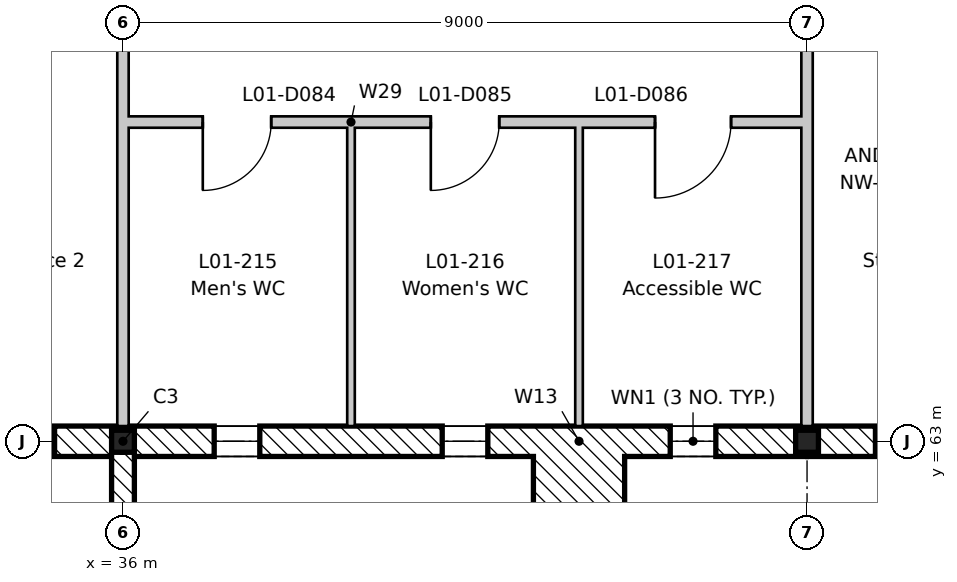
"""IFC4 building model, lengths in metres.
Left out: names, types, materials, properties, quantities, classifications, styles, units other than length and angle.
Written with IfcOpenShell. Run it as: python <this file> out.ifc"""

import sys

from ifc_helpers import new_model, si_unit, direction, frame, frame_2d, origin, origin_2d, place, context, subcontext, project, spatial, rectangle, i_section, extrude, element, fill, save


model = new_model("IFC4")
c1 = context("Model", 3, precision=1e-05, world=origin(), true_north=direction((0.0, 1.0)))
c2 = subcontext(c1, "Body", "Model", "MODEL_VIEW")
j1 = project(units=[si_unit("LENGTHUNIT", "METRE"), si_unit("PLANEANGLEUNIT", "RADIAN")], contexts=[c1])
p1 = place(None, origin())
s1 = spatial("IfcSite", under=j1, at=p1, CompositionType="ELEMENT")
p2 = place(p1, origin())
s2 = spatial("IfcBuilding", under=s1, at=p2, CompositionType="ELEMENT")
p3 = place(p2, frame((0.0, 0.0, 5.4)))
s3 = spatial("IfcBuildingStorey", under=s2, at=p3, CompositionType="ELEMENT", Elevation=5.4)
for number, where, z_axis, x_axis in (
    (1, (36.0, 63.0, -0.2), (0.0, 0.0, 1.0), (1.0, 0.0, 0.0)),
    (2, (45.0, 63.0, -0.2), (0.0, 0.0, 1.0), (1.0, 0.0, 0.0)),
):
    element("IfcColumn", number, at=place(p3, frame(where, z_axis=z_axis, x_axis=x_axis)), inside=s3, PredefinedType="COLUMN", context=c2, shape_type="SweptSolid", body=[
        extrude(i_section(OverallWidth=0.3, OverallDepth=0.29, WebThickness=0.009, FlangeThickness=0.014, FilletRadius=0.027, at=origin_2d()), origin(), (0.0, 0.0, 1.0), 4.5),
    ])
p4 = place(p3, frame((35.991, 63.0, 0.0), z_axis=(0.0, 0.0, 1.0), x_axis=(-1.0, 0.0, 0.0)))
e3 = element("IfcWall", 3, at=p4, inside=s3, PredefinedType="STANDARD", context=c2, shape_type="SweptSolid", body=[
    extrude(rectangle(XDim=8.981, YDim=0.4, at=frame_2d((4.491, 0.0))), origin(), (0.0, 0.0, 1.0), 3.9),
])
p5 = place(p4, frame((3.591, 0.0, 0.0)))
e4 = element("IfcOpeningElement", 4, at=p5, cuts=e3, PredefinedType="OPENING", context=c2, shape_type="SweptSolid", body=[
    extrude(rectangle(XDim=1.8, YDim=2.4, at=frame_2d((0.9, 1.2))), frame((0.0, 0.21, 0.0), z_axis=(0.0, -1.0, 0.0), x_axis=(1.0, 0.0, 0.0)), (0.0, 0.0, 1.0), 0.42),
])
p6 = place(p4, frame((6.891, 0.0, 0.9)))
e5 = element("IfcOpeningElement", 5, at=p6, cuts=e3, PredefinedType="OPENING", context=c2, shape_type="SweptSolid", body=[
    extrude(rectangle(XDim=1.2, YDim=2.4, at=frame_2d((0.6, 1.2))), frame((0.0, 0.21, 0.0), z_axis=(0.0, -1.0, 0.0), x_axis=(1.0, 0.0, 0.0)), (0.0, 0.0, 1.0), 0.42),
])
p7 = place(p4, frame((0.891, 0.0, 0.9)))
e6 = element("IfcOpeningElement", 6, at=p7, cuts=e3, PredefinedType="OPENING", context=c2, shape_type="SweptSolid", body=[
    extrude(rectangle(XDim=1.2, YDim=2.4, at=frame_2d((0.6, 1.2))), frame((0.0, 0.21, 0.0), z_axis=(0.0, -1.0, 0.0), x_axis=(1.0, 0.0, 0.0)), (0.0, 0.0, 1.0), 0.42),
])
p8 = place(p3, frame((44.991, 63.0, 0.0), z_axis=(0.0, 0.0, 1.0), x_axis=(-1.0, 0.0, 0.0)))
e7 = element("IfcWall", 7, at=p8, inside=s3, PredefinedType="STANDARD", context=c2, shape_type="SweptSolid", body=[
    extrude(rectangle(XDim=8.981, YDim=0.4, at=frame_2d((4.491, 0.0))), origin(), (0.0, 0.0, 1.0), 3.9),
])
p9 = place(p8, frame((7.191, 0.0, 1.5)))
e8 = element("IfcOpeningElement", 8, at=p9, cuts=e7, PredefinedType="OPENING", context=c2, shape_type="SweptSolid", body=[
    extrude(rectangle(XDim=0.6, YDim=1.2, at=frame_2d((0.3, 0.6))), frame((0.0, 0.21, 0.0), z_axis=(0.0, -1.0, 0.0), x_axis=(1.0, 0.0, 0.0)), (0.0, 0.0, 1.0), 0.42),
])
p10 = place(p8, frame((4.191, 0.0, 1.5)))
e9 = element("IfcOpeningElement", 9, at=p10, cuts=e7, PredefinedType="OPENING", context=c2, shape_type="SweptSolid", body=[
    extrude(rectangle(XDim=0.6, YDim=1.2, at=frame_2d((0.3, 0.6))), frame((0.0, 0.21, 0.0), z_axis=(0.0, -1.0, 0.0), x_axis=(1.0, 0.0, 0.0)), (0.0, 0.0, 1.0), 0.42),
])
p11 = place(p8, frame((1.191, 0.0, 1.5)))
e10 = element("IfcOpeningElement", 10, at=p11, cuts=e7, PredefinedType="OPENING", context=c2, shape_type="SweptSolid", body=[
    extrude(rectangle(XDim=0.6, YDim=1.2, at=frame_2d((0.3, 0.6))), frame((0.0, 0.21, 0.0), z_axis=(0.0, -1.0, 0.0), x_axis=(1.0, 0.0, 0.0)), (0.0, 0.0, 1.0), 0.42),
])
p12 = place(p3, frame((53.991, 63.0, 0.0), z_axis=(0.0, 0.0, 1.0), x_axis=(-1.0, 0.0, 0.0)))
e11 = element("IfcWall", 11, at=p12, inside=s3, PredefinedType="STANDARD", context=c2, shape_type="SweptSolid", body=[
    extrude(rectangle(XDim=8.981, YDim=0.4, at=frame_2d((4.491, 0.0))), origin(), (0.0, 0.0, 1.0), 3.9),
])
p13 = place(p12, frame((6.891, 0.0, 0.9)))
e12 = element("IfcOpeningElement", 12, at=p13, cuts=e11, PredefinedType="OPENING", context=c2, shape_type="SweptSolid", body=[
    extrude(rectangle(XDim=1.2, YDim=2.4, at=frame_2d((0.6, 1.2))), frame((0.0, 0.21, 0.0), z_axis=(0.0, -1.0, 0.0), x_axis=(1.0, 0.0, 0.0)), (0.0, 0.0, 1.0), 0.42),
])
p14 = place(p12, frame((3.891, 0.0, 0.9)))
e13 = element("IfcOpeningElement", 13, at=p14, cuts=e11, PredefinedType="OPENING", context=c2, shape_type="SweptSolid", body=[
    extrude(rectangle(XDim=1.2, YDim=2.7, at=frame_2d((0.6, 1.35))), frame((0.0, 0.21, 0.0), z_axis=(0.0, -1.0, 0.0), x_axis=(1.0, 0.0, 0.0)), (0.0, 0.0, 1.0), 0.42),
])
p15 = place(p3, frame((41.4, 62.2, 0.0), z_axis=(0.0, 0.0, 1.0), x_axis=(1.0, 0.0, 0.0)))
e14 = element("IfcWall", 14, at=p15, inside=s3, PredefinedType="STANDARD", context=c2, shape_type="SweptSolid", body=[
    extrude(rectangle(XDim=1.2, YDim=1.2, at=frame_2d((0.6, 0.0))), origin(), (0.0, 0.0, 1.0), 4.5),
])
p16 = place(p3, frame((36.0, 62.855, 0.0), z_axis=(0.0, 0.0, 1.0), x_axis=(0.0, -1.0, 0.0)))
e15 = element("IfcWall", 15, at=p16, inside=s3, PredefinedType="STANDARD", context=c2, shape_type="SweptSolid", body=[
    extrude(rectangle(XDim=2.255, YDim=0.3, at=frame_2d((1.127, 0.0))), origin(), (0.0, 0.0, 1.0), 3.97),
])
for number, where, z_axis, x_axis in (
    (16, (36.0, 63.2, 0.0), (0.0, 0.0, 1.0), (0.0, 1.0, 0.0)),
    (17, (45.0, 63.2, 0.0), (0.0, 0.0, 1.0), (0.0, 1.0, 0.0)),
):
    element("IfcWall", number, at=place(p3, frame(where, z_axis=z_axis, x_axis=x_axis)), inside=s3, PredefinedType="PARTITIONING", context=c2, shape_type="SweptSolid", body=[
        extrude(rectangle(XDim=7.225, YDim=0.15, at=frame_2d((3.613, 0.0))), origin(), (0.0, 0.0, 1.0), 3.95),
    ])
p17 = place(p3, frame((36.075, 67.2, 0.0), z_axis=(0.0, 0.0, 1.0), x_axis=(1.0, 0.0, 0.0)))
e18 = element("IfcWall", 18, at=p17, inside=s3, PredefinedType="PARTITIONING", context=c2, shape_type="SweptSolid", body=[
    extrude(rectangle(XDim=8.85, YDim=0.15, at=frame_2d((4.425, 0.0))), origin(), (0.0, 0.0, 1.0), 4.3),
])
p18 = place(p17, frame((0.975, 0.0, 0.0)))
e19 = element("IfcOpeningElement", 19, at=p18, cuts=e18, PredefinedType="OPENING", context=c2, shape_type="SweptSolid", body=[
    extrude(rectangle(XDim=0.9, YDim=2.1, at=frame_2d((0.45, 1.05))), frame((0.0, 0.085, 0.0), z_axis=(0.0, -1.0, 0.0), x_axis=(1.0, 0.0, 0.0)), (0.0, 0.0, 1.0), 0.17),
])
p19 = place(p17, frame((3.975, 0.0, 0.0)))
e20 = element("IfcOpeningElement", 20, at=p19, cuts=e18, PredefinedType="OPENING", context=c2, shape_type="SweptSolid", body=[
    extrude(rectangle(XDim=0.9, YDim=2.1, at=frame_2d((0.45, 1.05))), frame((0.0, 0.085, 0.0), z_axis=(0.0, -1.0, 0.0), x_axis=(1.0, 0.0, 0.0)), (0.0, 0.0, 1.0), 0.17),
])
p20 = place(p17, frame((6.925, 0.0, 0.0)))
e21 = element("IfcOpeningElement", 21, at=p20, cuts=e18, PredefinedType="OPENING", context=c2, shape_type="SweptSolid", body=[
    extrude(rectangle(XDim=1.0, YDim=2.1, at=frame_2d((0.5, 1.05))), frame((0.0, 0.085, 0.0), z_axis=(0.0, -1.0, 0.0), x_axis=(1.0, 0.0, 0.0)), (0.0, 0.0, 1.0), 0.17),
])
for number, where, z_axis, x_axis in (
    (22, (39.0, 63.2, 0.0), (0.0, 0.0, 1.0), (0.0, 1.0, 0.0)),
    (23, (42.0, 63.2, 0.0), (0.0, 0.0, 1.0), (0.0, 1.0, 0.0)),
):
    element("IfcWall", number, at=place(p3, frame(where, z_axis=z_axis, x_axis=x_axis)), inside=s3, PredefinedType="PARTITIONING", context=c2, shape_type="SweptSolid", body=[
        extrude(rectangle(XDim=3.925, YDim=0.1, at=frame_2d((1.962, 0.0))), origin(), (0.0, 0.0, 1.0), 4.3),
    ])
p21 = place(p7, origin())
e24 = element("IfcWindow", 24, at=p21, inside=s3, PartitioningType="SINGLE_PANEL", PredefinedType="WINDOW", context=c2, shape_type="SweptSolid", body=[
    extrude(rectangle(XDim=1.2, YDim=2.4, at=frame_2d((0.6, 1.2))), frame((0.0, -0.12, 0.0), z_axis=(0.0, -1.0, 0.0), x_axis=(1.0, 0.0, 0.0)), (0.0, 0.0, 1.0), 0.06),
])
fill(e6, e24)
p22 = place(p9, origin())
e25 = element("IfcWindow", 25, at=p22, inside=s3, PartitioningType="SINGLE_PANEL", PredefinedType="WINDOW", context=c2, shape_type="SweptSolid", body=[
    extrude(rectangle(XDim=0.6, YDim=1.2, at=frame_2d((0.3, 0.6))), frame((0.0, -0.12, 0.0), z_axis=(0.0, -1.0, 0.0), x_axis=(1.0, 0.0, 0.0)), (0.0, 0.0, 1.0), 0.06),
])
fill(e8, e25)
p23 = place(p10, origin())
e26 = element("IfcWindow", 26, at=p23, inside=s3, PartitioningType="SINGLE_PANEL", PredefinedType="WINDOW", context=c2, shape_type="SweptSolid", body=[
    extrude(rectangle(XDim=0.6, YDim=1.2, at=frame_2d((0.3, 0.6))), frame((0.0, -0.12, 0.0), z_axis=(0.0, -1.0, 0.0), x_axis=(1.0, 0.0, 0.0)), (0.0, 0.0, 1.0), 0.06),
])
fill(e9, e26)
p24 = place(p11, origin())
e27 = element("IfcWindow", 27, at=p24, inside=s3, PartitioningType="SINGLE_PANEL", PredefinedType="WINDOW", context=c2, shape_type="SweptSolid", body=[
    extrude(rectangle(XDim=0.6, YDim=1.2, at=frame_2d((0.3, 0.6))), frame((0.0, -0.12, 0.0), z_axis=(0.0, -1.0, 0.0), x_axis=(1.0, 0.0, 0.0)), (0.0, 0.0, 1.0), 0.06),
])
fill(e10, e27)
p25 = place(p13, origin())
e28 = element("IfcWindow", 28, at=p25, inside=s3, PartitioningType="SINGLE_PANEL", PredefinedType="WINDOW", context=c2, shape_type="SweptSolid", body=[
    extrude(rectangle(XDim=1.2, YDim=2.4, at=frame_2d((0.6, 1.2))), frame((0.0, -0.12, 0.0), z_axis=(0.0, -1.0, 0.0), x_axis=(1.0, 0.0, 0.0)), (0.0, 0.0, 1.0), 0.06),
])
fill(e12, e28)
p26 = place(p18, frame((0.9, 0.0, 0.0), z_axis=(0.0, 0.0, 1.0), x_axis=(-1.0, 0.0, 0.0)))
e29 = element("IfcDoor", 29, at=p26, inside=s3, OperationType="SINGLE_SWING_RIGHT", PredefinedType="DOOR", context=c2, shape_type="SweptSolid", body=[
    extrude(rectangle(XDim=0.9, YDim=2.1, at=frame_2d((0.45, 1.05))), frame((0.0, 0.025, 0.0), z_axis=(0.0, -1.0, 0.0), x_axis=(1.0, 0.0, 0.0)), (0.0, 0.0, 1.0), 0.05),
])
fill(e19, e29)
p27 = place(p19, frame((0.9, 0.0, 0.0), z_axis=(0.0, 0.0, 1.0), x_axis=(-1.0, 0.0, 0.0)))
e30 = element("IfcDoor", 30, at=p27, inside=s3, OperationType="SINGLE_SWING_RIGHT", PredefinedType="DOOR", context=c2, shape_type="SweptSolid", body=[
    extrude(rectangle(XDim=0.9, YDim=2.1, at=frame_2d((0.45, 1.05))), frame((0.0, 0.025, 0.0), z_axis=(0.0, -1.0, 0.0), x_axis=(1.0, 0.0, 0.0)), (0.0, 0.0, 1.0), 0.05),
])
fill(e20, e30)
p28 = place(p20, frame((1.0, 0.0, 0.0), z_axis=(0.0, 0.0, 1.0), x_axis=(-1.0, 0.0, 0.0)))
e31 = element("IfcDoor", 31, at=p28, inside=s3, OperationType="SINGLE_SWING_RIGHT", PredefinedType="DOOR", context=c2, shape_type="SweptSolid", body=[
    extrude(rectangle(XDim=1.0, YDim=2.1, at=frame_2d((0.5, 1.05))), frame((0.0, 0.025, 0.0), z_axis=(0.0, -1.0, 0.0), x_axis=(1.0, 0.0, 0.0)), (0.0, 0.0, 1.0), 0.05),
])
fill(e21, e31)
save(model, sys.argv[1])
